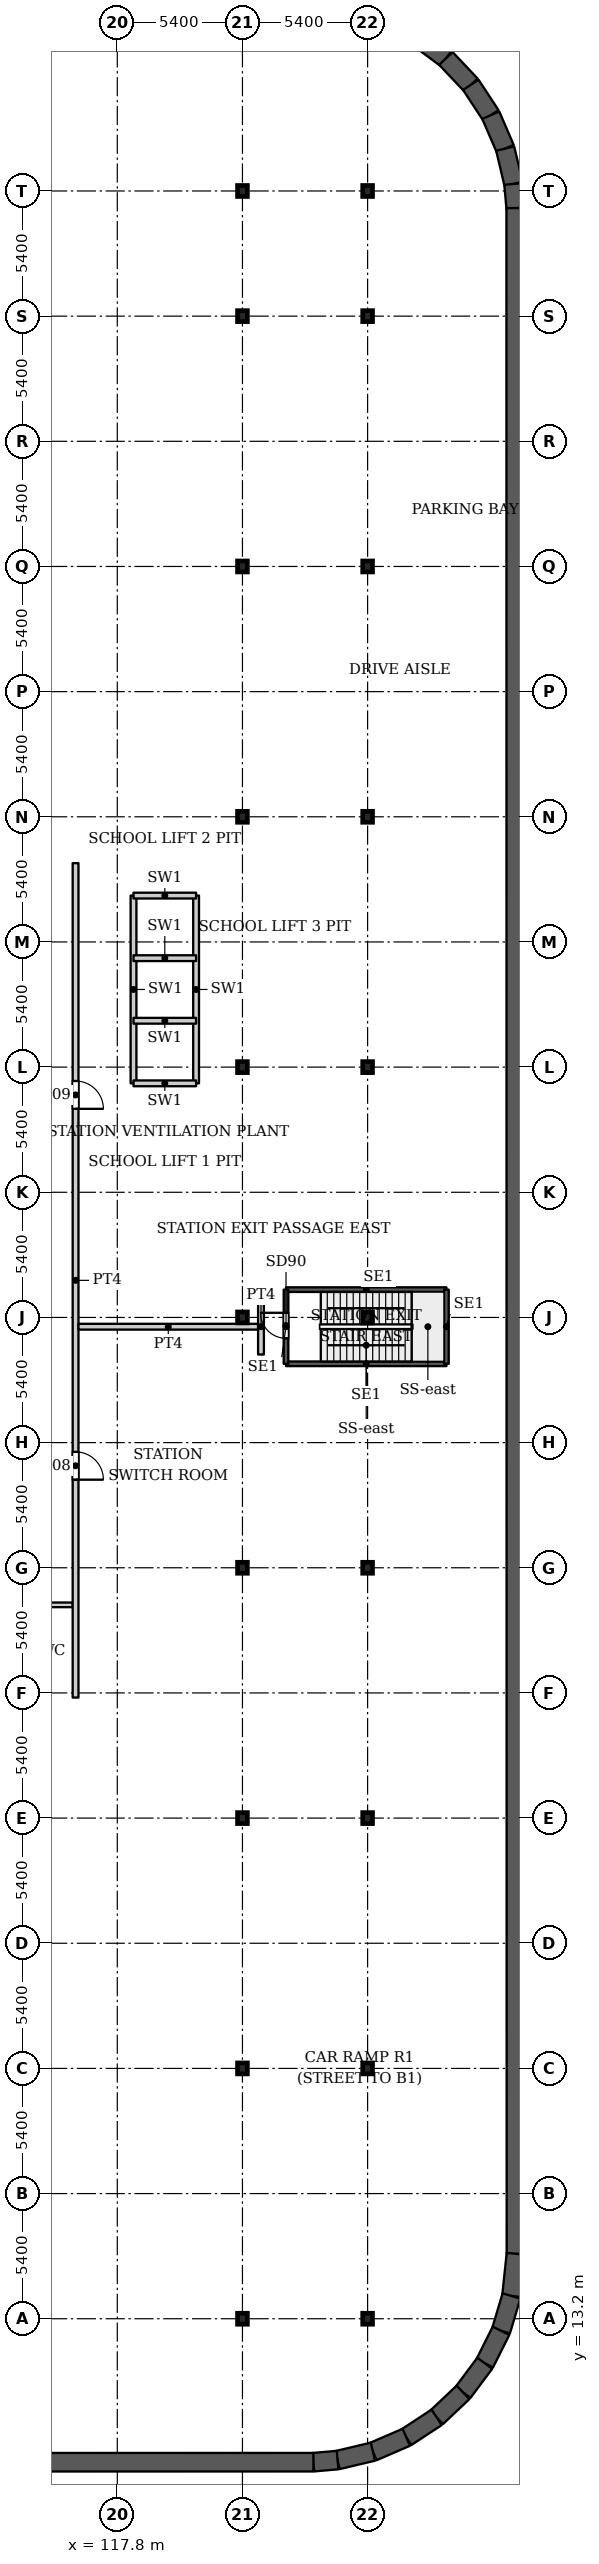
"""IFC4 building model, lengths in metres.
Left out: names, types, materials, properties, quantities, classifications, styles, units other than length and angle.
Written with IfcOpenShell. Run it as: python <this file> out.ifc"""

import sys

from ifc_helpers import new_model, si_unit, direction, frame, frame_2d, origin, origin_2d, place, context, subcontext, project, spatial, rectangle, i_section, extrude, source, transform, mapped, element, fill, save


model = new_model("IFC4")
c1 = context("Model", 3, precision=1e-05, world=origin(), true_north=direction((0.0, 1.0)))
c2 = subcontext(c1, "Body", "Model", "MODEL_VIEW")
j1 = project(units=[si_unit("LENGTHUNIT", "METRE"), si_unit("PLANEANGLEUNIT", "RADIAN")], contexts=[c1])
p1 = place(None, origin())
s1 = spatial("IfcSite", under=j1, at=p1, CompositionType="ELEMENT")
p2 = place(p1, origin())
s2 = spatial("IfcBuilding", under=s1, at=p2, CompositionType="ELEMENT")
p3 = place(p2, frame((0.0, 0.0, -5.0)))
s3 = spatial("IfcBuildingStorey", under=s2, at=p3, CompositionType="ELEMENT", Elevation=-5.0)
for number, where, z_axis, x_axis in (
    (1, (123.2, 13.2, 0.0), (0.0, 0.0, 1.0), (1.0, 0.0, 0.0)),
    (2, (128.6, 13.2, 0.0), (0.0, 0.0, 1.0), (1.0, 0.0, 0.0)),
    (3, (123.2, 24.0, 0.0), (0.0, 0.0, 1.0), (1.0, 0.0, 0.0)),
    (4, (128.6, 24.0, 0.0), (0.0, 0.0, 1.0), (1.0, 0.0, 0.0)),
    (5, (123.2, 34.8, 0.0), (0.0, 0.0, 1.0), (1.0, 0.0, 0.0)),
    (6, (128.6, 34.8, 0.0), (0.0, 0.0, 1.0), (1.0, 0.0, 0.0)),
    (7, (123.2, 45.6, 0.0), (0.0, 0.0, 1.0), (1.0, 0.0, 0.0)),
    (8, (128.6, 45.6, 0.0), (0.0, 0.0, 1.0), (1.0, 0.0, 0.0)),
    (9, (123.2, 56.4, 0.0), (0.0, 0.0, 1.0), (1.0, 0.0, 0.0)),
    (10, (128.6, 56.4, 0.0), (0.0, 0.0, 1.0), (1.0, 0.0, 0.0)),
    (11, (123.2, 67.2, 0.0), (0.0, 0.0, 1.0), (1.0, 0.0, 0.0)),
    (12, (128.6, 67.2, 0.0), (0.0, 0.0, 1.0), (1.0, 0.0, 0.0)),
    (13, (123.2, 78.0, 0.0), (0.0, 0.0, 1.0), (1.0, 0.0, 0.0)),
    (14, (128.6, 78.0, 0.0), (0.0, 0.0, 1.0), (1.0, 0.0, 0.0)),
    (15, (123.2, 88.8, 0.0), (0.0, 0.0, 1.0), (1.0, 0.0, 0.0)),
    (16, (128.6, 88.8, 0.0), (0.0, 0.0, 1.0), (1.0, 0.0, 0.0)),
    (17, (123.2, 99.6, 0.0), (0.0, 0.0, 1.0), (1.0, 0.0, 0.0)),
    (18, (128.6, 99.6, 0.0), (0.0, 0.0, 1.0), (1.0, 0.0, 0.0)),
    (19, (123.2, 105.0, 0.0), (0.0, 0.0, 1.0), (1.0, 0.0, 0.0)),
    (20, (128.6, 105.0, 0.0), (0.0, 0.0, 1.0), (1.0, 0.0, 0.0)),
):
    element("IfcColumn", number, at=place(p3, frame(where, z_axis=z_axis, x_axis=x_axis)), inside=s3, PredefinedType="COLUMN", context=c2, shape_type="SweptSolid", body=[
        extrude(i_section(OverallWidth=0.424, OverallDepth=0.474, WebThickness=0.048, FlangeThickness=0.077, FilletRadius=0.014, at=origin_2d()), origin(), (0.0, 0.0, 1.0), 5.0),
    ])
p4 = place(p3, frame((130.721, 111.654, 0.0), z_axis=(0.0, 0.0, 1.0), x_axis=(0.801771638905, -0.597630520512, 0.0)))
e21 = element("IfcWall", 21, at=p4, inside=s3, PredefinedType="SOLIDWALL", context=c2, shape_type="SweptSolid", body=[
    extrude(rectangle(XDim=1.568, YDim=0.8, at=frame_2d((0.784, 0.0))), origin(), (0.0, 0.0, 1.0), 5.0),
])
p5 = place(p3, frame((131.978, 110.717, 0.0), z_axis=(0.0, 0.0, 1.0), x_axis=(0.686641833089, -0.726995868662, 0.0)))
e22 = element("IfcWall", 22, at=p5, inside=s3, PredefinedType="SOLIDWALL", context=c2, shape_type="SweptSolid", body=[
    extrude(rectangle(XDim=1.567, YDim=0.8, at=frame_2d((0.783, 0.0))), origin(), (0.0, 0.0, 1.0), 5.0),
])
p6 = place(p3, frame((133.054, 109.578, 0.0), z_axis=(0.0, 0.0, 1.0), x_axis=(0.549333272834, -0.835603348101, 0.0)))
e23 = element("IfcWall", 23, at=p6, inside=s3, PredefinedType="SOLIDWALL", context=c2, shape_type="SweptSolid", body=[
    extrude(rectangle(XDim=1.568, YDim=0.8, at=frame_2d((0.784, 0.0))), origin(), (0.0, 0.0, 1.0), 5.0),
])
p7 = place(p3, frame((133.915, 108.268, 0.0), z_axis=(0.0, 0.0, 1.0), x_axis=(0.396155493925, -0.918183437355, 0.0)))
e24 = element("IfcWall", 24, at=p7, inside=s3, PredefinedType="SOLIDWALL", context=c2, shape_type="SweptSolid", body=[
    extrude(rectangle(XDim=1.567, YDim=0.8, at=frame_2d((0.784, 0.0))), origin(), (0.0, 0.0, 1.0), 5.0),
])
p8 = place(p3, frame((134.536, 106.829, 0.0), z_axis=(0.0, 0.0, 1.0), x_axis=(0.230834833469, -0.972992949439, 0.0)))
e25 = element("IfcWall", 25, at=p8, inside=s3, PredefinedType="SOLIDWALL", context=c2, shape_type="SweptSolid", body=[
    extrude(rectangle(XDim=1.569, YDim=0.8, at=frame_2d((0.784, 0.0))), origin(), (0.0, 0.0, 1.0), 5.0),
])
p9 = place(p3, frame((134.898, 105.303, 0.0), z_axis=(0.0, 0.0, 1.0), x_axis=(0.087062712427, -0.996202832813, 0.0)))
e26 = element("IfcWall", 26, at=p9, inside=s3, PredefinedType="SOLIDWALL", context=c2, shape_type="SweptSolid", body=[
    extrude(rectangle(XDim=1.046, YDim=0.8, at=frame_2d((0.523, 0.0))), origin(), (0.0, 0.0, 1.0), 5.0),
])
p10 = place(p3, frame((134.989, 104.261, 0.0), z_axis=(0.0, 0.0, 1.0), x_axis=(0.000124475473, -0.999999992253, 0.0)))
e27 = element("IfcWall", 27, at=p10, inside=s3, PredefinedType="SOLIDWALL", context=c2, shape_type="SweptSolid", body=[
    extrude(rectangle(XDim=88.261, YDim=0.8, at=frame_2d((44.13, 0.0))), origin(), (0.0, 0.0, 1.0), 5.0),
])
p11 = place(p3, frame((135.0, 16.0, 0.0), z_axis=(0.0, 0.0, 1.0), x_axis=(-0.105567043429, -0.994412187849, 0.0)))
e28 = element("IfcWall", 28, at=p11, inside=s3, PredefinedType="SOLIDWALL", context=c2, shape_type="SweptSolid", body=[
    extrude(rectangle(XDim=1.829, YDim=0.8, at=frame_2d((0.915, 0.0))), origin(), (0.0, 0.0, 1.0), 5.0),
])
p12 = place(p3, frame((134.807, 14.181, 0.0), z_axis=(0.0, 0.0, 1.0), x_axis=(-0.287147763375, -0.957886299092, 0.0)))
e29 = element("IfcWall", 29, at=p12, inside=s3, PredefinedType="SOLIDWALL", context=c2, shape_type="SweptSolid", body=[
    extrude(rectangle(XDim=1.567, YDim=0.8, at=frame_2d((0.783, 0.0))), origin(), (0.0, 0.0, 1.0), 5.0),
])
p13 = place(p3, frame((134.357, 12.68, 0.0), z_axis=(0.0, 0.0, 1.0), x_axis=(-0.448459314462, -0.893803246399, 0.0)))
e30 = element("IfcWall", 30, at=p13, inside=s3, PredefinedType="SOLIDWALL", context=c2, shape_type="SweptSolid", body=[
    extrude(rectangle(XDim=1.567, YDim=0.8, at=frame_2d((0.784, 0.0))), origin(), (0.0, 0.0, 1.0), 5.0),
])
p14 = place(p3, frame((133.654, 11.279, 0.0), z_axis=(0.0, 0.0, 1.0), x_axis=(-0.597630520512, -0.801771638905, 0.0)))
e31 = element("IfcWall", 31, at=p14, inside=s3, PredefinedType="SOLIDWALL", context=c2, shape_type="SweptSolid", body=[
    extrude(rectangle(XDim=1.568, YDim=0.8, at=frame_2d((0.784, 0.0))), origin(), (0.0, 0.0, 1.0), 5.0),
])
p15 = place(p3, frame((132.717, 10.022, 0.0), z_axis=(0.0, 0.0, 1.0), x_axis=(-0.726995868662, -0.686641833089, 0.0)))
e32 = element("IfcWall", 32, at=p15, inside=s3, PredefinedType="SOLIDWALL", context=c2, shape_type="SweptSolid", body=[
    extrude(rectangle(XDim=1.567, YDim=0.8, at=frame_2d((0.783, 0.0))), origin(), (0.0, 0.0, 1.0), 5.0),
])
p16 = place(p3, frame((131.578, 8.946, 0.0), z_axis=(0.0, 0.0, 1.0), x_axis=(-0.835603348101, -0.549333272834, 0.0)))
e33 = element("IfcWall", 33, at=p16, inside=s3, PredefinedType="SOLIDWALL", context=c2, shape_type="SweptSolid", body=[
    extrude(rectangle(XDim=1.568, YDim=0.8, at=frame_2d((0.784, 0.0))), origin(), (0.0, 0.0, 1.0), 5.0),
])
p17 = place(p3, frame((130.268, 8.085, 0.0), z_axis=(0.0, 0.0, 1.0), x_axis=(-0.918183437355, -0.396155493925, 0.0)))
e34 = element("IfcWall", 34, at=p17, inside=s3, PredefinedType="SOLIDWALL", context=c2, shape_type="SweptSolid", body=[
    extrude(rectangle(XDim=1.567, YDim=0.8, at=frame_2d((0.784, 0.0))), origin(), (0.0, 0.0, 1.0), 5.0),
])
p18 = place(p3, frame((128.829, 7.464, 0.0), z_axis=(0.0, 0.0, 1.0), x_axis=(-0.972992949439, -0.230834833469, 0.0)))
e35 = element("IfcWall", 35, at=p18, inside=s3, PredefinedType="SOLIDWALL", context=c2, shape_type="SweptSolid", body=[
    extrude(rectangle(XDim=1.569, YDim=0.8, at=frame_2d((0.784, 0.0))), origin(), (0.0, 0.0, 1.0), 5.0),
])
p19 = place(p3, frame((127.303, 7.102, 0.0), z_axis=(0.0, 0.0, 1.0), x_axis=(-0.996202832813, -0.087062712427, 0.0)))
e36 = element("IfcWall", 36, at=p19, inside=s3, PredefinedType="SOLIDWALL", context=c2, shape_type="SweptSolid", body=[
    extrude(rectangle(XDim=1.046, YDim=0.8, at=frame_2d((0.523, 0.0))), origin(), (0.0, 0.0, 1.0), 5.0),
])
p20 = place(p3, frame((126.261, 7.011, 0.0), z_axis=(0.0, 0.0, 1.0), x_axis=(-0.999999994851, -0.000101480029, 0.0)))
e37 = element("IfcWall", 37, at=p20, inside=s3, PredefinedType="SOLIDWALL", context=c2, shape_type="SweptSolid", body=[
    extrude(rectangle(XDim=108.261, YDim=0.8, at=frame_2d((54.13, 0.0))), origin(), (0.0, 0.0, 1.0), 5.0),
])
for number, where, z_axis, x_axis in (
    (38, (118.5, 66.5, 0.0), (0.0, 0.0, 1.0), (0.0, 1.0, 0.0)),
    (39, (121.2, 66.5, 0.0), (0.0, 0.0, 1.0), (0.0, 1.0, 0.0)),
):
    element("IfcWall", number, at=place(p3, frame(where, z_axis=z_axis, x_axis=x_axis)), inside=s3, PredefinedType="PARTITIONING", context=c2, shape_type="SweptSolid", body=[
        extrude(rectangle(XDim=8.1, YDim=0.25, at=frame_2d((4.05, 0.0))), origin(), (0.0, 0.0, 1.0), 5.0),
    ])
for number, where, z_axis, x_axis in (
    (40, (118.5, 66.5, 0.0), (0.0, 0.0, 1.0), (1.0, 0.0, 0.0)),
    (41, (118.5, 69.2, 0.0), (0.0, 0.0, 1.0), (1.0, 0.0, 0.0)),
    (42, (118.5, 71.9, 0.0), (0.0, 0.0, 1.0), (1.0, 0.0, 0.0)),
    (43, (118.5, 74.6, 0.0), (0.0, 0.0, 1.0), (1.0, 0.0, 0.0)),
):
    element("IfcWall", number, at=place(p3, frame(where, z_axis=z_axis, x_axis=x_axis)), inside=s3, PredefinedType="PARTITIONING", context=c2, shape_type="SweptSolid", body=[
        extrude(rectangle(XDim=2.7, YDim=0.25, at=frame_2d((1.35, 0.0))), origin(), (0.0, 0.0, 1.0), 5.0),
    ])
for number, where, z_axis, x_axis in (
    (44, (125.08, 54.4, 0.0), (0.0, 0.0, 1.0), (1.0, 0.0, 0.0)),
    (45, (125.08, 57.6, 0.0), (0.0, 0.0, 1.0), (1.0, 0.0, 0.0)),
):
    element("IfcWall", number, at=place(p3, frame(where, z_axis=z_axis, x_axis=x_axis)), inside=s3, PredefinedType="SHEAR", context=c2, shape_type="SweptSolid", body=[
        extrude(rectangle(XDim=6.92, YDim=0.2, at=frame_2d((3.46, 0.0))), origin(), (0.0, 0.0, 1.0), 5.0),
    ])
p21 = place(p3, frame((125.08, 54.4, 0.0), z_axis=(0.0, 0.0, 1.0), x_axis=(0.0, 1.0, 0.0)))
e46 = element("IfcWall", 46, at=p21, inside=s3, PredefinedType="SHEAR", context=c2, shape_type="SweptSolid", body=[
    extrude(rectangle(XDim=3.2, YDim=0.2, at=frame_2d((1.6, 0.0))), origin(), (0.0, 0.0, 1.0), 5.0),
])
p22 = place(p21, frame((1.1, 0.0, 0.0)))
e47 = element("IfcOpeningElement", 47, at=p22, cuts=e46, PredefinedType="OPENING", context=c2, shape_type="SweptSolid", body=[
    extrude(rectangle(XDim=1.1, YDim=2.2, at=frame_2d((0.55, 1.1))), frame((0.0, 0.11, 0.0), z_axis=(0.0, -1.0, 0.0), x_axis=(1.0, 0.0, 0.0)), (0.0, 0.0, 1.0), 0.22),
])
p23 = place(p3, frame((132.0, 54.4, 0.0), z_axis=(0.0, 0.0, 1.0), x_axis=(0.0, 1.0, 0.0)))
e48 = element("IfcWall", 48, at=p23, inside=s3, PredefinedType="SHEAR", context=c2, shape_type="SweptSolid", body=[
    extrude(rectangle(XDim=3.2, YDim=0.2, at=frame_2d((1.6, 0.0))), origin(), (0.0, 0.0, 1.0), 5.0),
])
p24 = place(p3, frame((56.1, 44.0, 0.0), z_axis=(0.0, 0.0, 1.0), x_axis=(1.0, 0.0, 0.0)))
e49 = element("IfcWall", 49, at=p24, inside=s3, PredefinedType="PARTITIONING", context=c2, shape_type="SweptSolid", body=[
    extrude(rectangle(XDim=59.775, YDim=0.2, at=frame_2d((29.887, 0.0))), origin(), (0.0, 0.0, 1.0), 4.58),
])
p25 = place(p24, frame((11.3, 0.0, 0.0)))
e50 = element("IfcOpeningElement", 50, at=p25, cuts=e49, PredefinedType="OPENING", context=c2, shape_type="SweptSolid", body=[
    extrude(rectangle(XDim=1.2, YDim=2.1, at=frame_2d((0.6, 1.05))), frame((0.0, 0.11, 0.0), z_axis=(0.0, -1.0, 0.0), x_axis=(1.0, 0.0, 0.0)), (0.0, 0.0, 1.0), 0.22),
])
p26 = place(p24, frame((29.3, 0.0, 0.0)))
e51 = element("IfcOpeningElement", 51, at=p26, cuts=e49, PredefinedType="OPENING", context=c2, shape_type="SweptSolid", body=[
    extrude(rectangle(XDim=1.2, YDim=2.1, at=frame_2d((0.6, 1.05))), frame((0.0, 0.11, 0.0), z_axis=(0.0, -1.0, 0.0), x_axis=(1.0, 0.0, 0.0)), (0.0, 0.0, 1.0), 0.22),
])
p27 = place(p24, frame((39.3, 0.0, 0.0)))
e52 = element("IfcOpeningElement", 52, at=p27, cuts=e49, PredefinedType="OPENING", context=c2, shape_type="SweptSolid", body=[
    extrude(rectangle(XDim=1.0, YDim=2.1, at=frame_2d((0.5, 1.05))), frame((0.0, 0.11, 0.0), z_axis=(0.0, -1.0, 0.0), x_axis=(1.0, 0.0, 0.0)), (0.0, 0.0, 1.0), 0.22),
])
p28 = place(p24, frame((47.3, 0.0, 0.0)))
e53 = element("IfcOpeningElement", 53, at=p28, cuts=e49, PredefinedType="OPENING", context=c2, shape_type="SweptSolid", body=[
    extrude(rectangle(XDim=1.0, YDim=2.1, at=frame_2d((0.5, 1.05))), frame((0.0, 0.11, 0.0), z_axis=(0.0, -1.0, 0.0), x_axis=(1.0, 0.0, 0.0)), (0.0, 0.0, 1.0), 0.22),
])
p29 = place(p24, frame((50.25, 0.0, 0.0)))
e54 = element("IfcOpeningElement", 54, at=p29, cuts=e49, PredefinedType="OPENING", context=c2, shape_type="SweptSolid", body=[
    extrude(rectangle(XDim=1.2, YDim=2.1, at=frame_2d((0.6, 1.05))), frame((0.0, 0.11, 0.0), z_axis=(0.0, -1.0, 0.0), x_axis=(1.0, 0.0, 0.0)), (0.0, 0.0, 1.0), 0.22),
])
p30 = place(p24, frame((54.8, 0.0, 0.0)))
e55 = element("IfcOpeningElement", 55, at=p30, cuts=e49, PredefinedType="OPENING", context=c2, shape_type="SweptSolid", body=[
    extrude(rectangle(XDim=1.0, YDim=2.1, at=frame_2d((0.5, 1.05))), frame((0.0, 0.11, 0.0), z_axis=(0.0, -1.0, 0.0), x_axis=(1.0, 0.0, 0.0)), (0.0, 0.0, 1.0), 0.22),
])
p31 = place(p3, frame((116.0, 40.0, 0.0), z_axis=(0.0, 0.0, 1.0), x_axis=(0.0, 1.0, 0.0)))
e56 = element("IfcWall", 56, at=p31, inside=s3, PredefinedType="PARTITIONING", context=c2, shape_type="SweptSolid", body=[
    extrude(rectangle(XDim=36.0, YDim=0.25, at=frame_2d((18.0, 0.0))), origin(), (0.0, 0.0, 1.0), 4.58),
])
p32 = place(p31, frame((9.4, 0.0, 0.0)))
e57 = element("IfcOpeningElement", 57, at=p32, cuts=e56, PredefinedType="OPENING", context=c2, shape_type="SweptSolid", body=[
    extrude(rectangle(XDim=1.2, YDim=2.1, at=frame_2d((0.6, 1.05))), frame((0.0, 0.135, 0.0), z_axis=(0.0, -1.0, 0.0), x_axis=(1.0, 0.0, 0.0)), (0.0, 0.0, 1.0), 0.27),
])
p33 = place(p31, frame((25.4, 0.0, 0.0)))
e58 = element("IfcOpeningElement", 58, at=p33, cuts=e56, PredefinedType="OPENING", context=c2, shape_type="SweptSolid", body=[
    extrude(rectangle(XDim=1.2, YDim=2.1, at=frame_2d((0.6, 1.05))), frame((0.0, 0.135, 0.0), z_axis=(0.0, -1.0, 0.0), x_axis=(1.0, 0.0, 0.0)), (0.0, 0.0, 1.0), 0.27),
])
p34 = place(p3, frame((116.125, 56.0, 0.0), z_axis=(0.0, 0.0, 1.0), x_axis=(1.0, 0.0, 0.0)))
e59 = element("IfcWall", 59, at=p34, inside=s3, PredefinedType="PARTITIONING", context=c2, shape_type="SweptSolid", body=[
    extrude(rectangle(XDim=7.75, YDim=0.25, at=frame_2d((3.875, 0.0))), origin(), (0.0, 0.0, 1.0), 4.58),
])
p35 = place(p3, frame((124.0, 54.8, 0.0), z_axis=(0.0, 0.0, 1.0), x_axis=(0.0, 1.0, 0.0)))
e60 = element("IfcWall", 60, at=p35, inside=s3, PredefinedType="PARTITIONING", context=c2, shape_type="SweptSolid", body=[
    extrude(rectangle(XDim=2.4, YDim=0.25, at=frame_2d((1.2, 0.0))), origin(), (0.0, 0.0, 1.0), 4.58),
])
m1 = source(origin(), c2, "Body", "SweptSolid", [
    extrude(rectangle(XDim=1.1, YDim=2.2, at=frame_2d((0.55, 1.1))), frame((0.0, 0.025, 0.0), z_axis=(0.0, -1.0, 0.0), x_axis=(1.0, 0.0, 0.0)), (0.0, 0.0, 1.0), 0.05),
])
p36 = place(p22, origin())
e61 = element("IfcDoor", 61, at=p36, inside=s3, OperationType="SINGLE_SWING_LEFT", PredefinedType="DOOR", context=c2, shape_type="MappedRepresentation", body=[
    mapped(m1, transform((0.0, 0.0, 0.0), x_axis=(1.0, 0.0, 0.0), y_axis=(0.0, 1.0, 0.0), z_axis=(0.0, 0.0, 1.0), scale=1.0)),
])
fill(e47, e61)
m2 = source(origin(), c2, "Body", "SweptSolid", [
    extrude(rectangle(XDim=1.2, YDim=2.1, at=frame_2d((0.6, 1.05))), frame((0.0, 0.025, 0.0), z_axis=(0.0, -1.0, 0.0), x_axis=(1.0, 0.0, 0.0)), (0.0, 0.0, 1.0), 0.05),
])
p37 = place(p32, origin())
e62 = element("IfcDoor", 62, at=p37, inside=s3, OperationType="SINGLE_SWING_RIGHT", PredefinedType="DOOR", context=c2, shape_type="MappedRepresentation", body=[
    mapped(m2, transform((0.0, 0.0, 0.0), x_axis=(1.0, 0.0, 0.0), y_axis=(0.0, 1.0, 0.0), z_axis=(0.0, 0.0, 1.0), scale=1.0)),
])
fill(e57, e62)
p38 = place(p33, origin())
e63 = element("IfcDoor", 63, at=p38, inside=s3, OperationType="SINGLE_SWING_RIGHT", PredefinedType="DOOR", context=c2, shape_type="MappedRepresentation", body=[
    mapped(m2, transform((0.0, 0.0, 0.0), x_axis=(1.0, 0.0, 0.0), y_axis=(0.0, 1.0, 0.0), z_axis=(0.0, 0.0, 1.0), scale=1.0)),
])
fill(e58, e63)
save(model, sys.argv[1])
